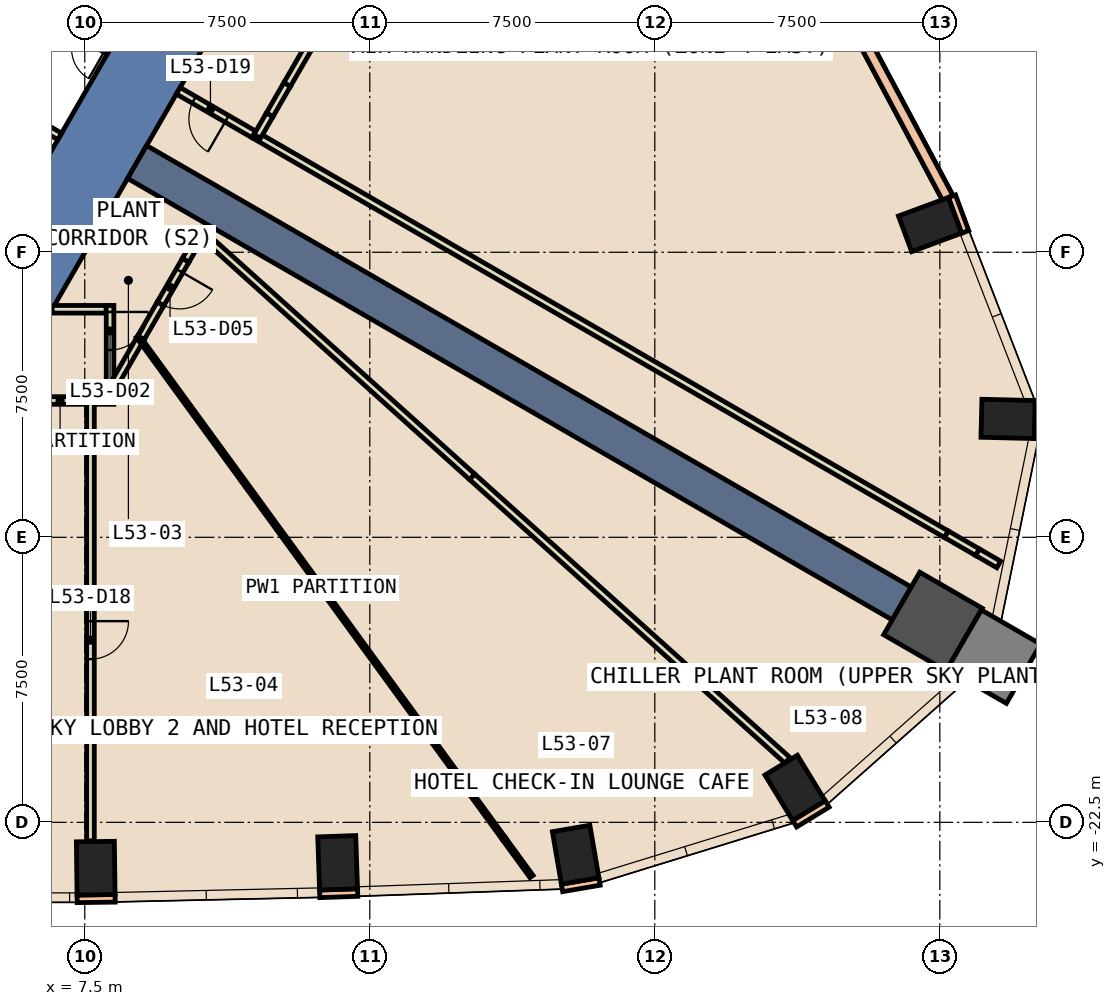
"""IFC4 building model, lengths in metres.
Left out: names, types, materials, properties, quantities, classifications, styles, units other than length and angle.
Written with IfcOpenShell. Run it as: python <this file> out.ifc"""

import sys

from ifc_helpers import new_model, si_unit, direction, frame, frame_2d, origin, origin_2d, place, context, subcontext, project, spatial, polyline, rectangle, outline, extrude, element, fill, save


model = new_model("IFC4")
c1 = context("Model", 3, precision=1e-05, world=origin(), true_north=direction((0.0, 1.0)))
c2 = subcontext(c1, "Body", "Model", "MODEL_VIEW")
j1 = project(units=[si_unit("LENGTHUNIT", "METRE"), si_unit("PLANEANGLEUNIT", "RADIAN")], contexts=[c1])
p1 = place(None, origin())
s1 = spatial("IfcSite", under=j1, at=p1, CompositionType="ELEMENT")
p2 = place(p1, origin())
s2 = spatial("IfcBuilding", under=s1, at=p2, CompositionType="ELEMENT")
p3 = place(p2, frame((0.0, 0.0, 236.0)))
s3 = spatial("IfcBuildingStorey", under=s2, at=p3, CompositionType="ELEMENT", Elevation=236.0)
for number, where, z_axis, x_axis in (
    (1, (7.788, -23.706, -0.6), (0.0, 0.0, 1.0), (1.0, 0.013, 0.0)),
    (2, (14.154, -23.565, -0.6), (0.0, 0.0, 1.0), (0.999, 0.034, 0.0)),
    (3, (20.417, -23.352, -0.6), (0.0, 0.0, 1.0), (0.986, 0.169, 0.0)),
    (4, (26.19, -21.593, -0.6), (0.0, 0.0, 1.0), (0.853, 0.521, 0.0)),
):
    element("IfcColumn", number, at=place(p3, frame(where, z_axis=z_axis, x_axis=x_axis)), inside=s3, PredefinedType="COLUMN", context=c2, shape_type="SweptSolid", body=[
        extrude(rectangle(XDim=1.0, YDim=1.4, at=origin_2d()), origin(), (0.0, 0.0, 1.0), 5.4),
    ])
p4 = place(p3, frame((29.82, -17.216, -0.6), z_axis=(0.0, 0.0, 1.0), x_axis=(-0.866025403784, 0.5, 0.0)))
e5 = element("IfcColumn", 5, at=p4, inside=s3, PredefinedType="COLUMN", context=c2, shape_type="SweptSolid", body=[
    extrude(rectangle(XDim=1.9, YDim=1.9, at=origin_2d()), origin(), (0.0, 0.0, 1.0), 5.4),
])
for number, where, z_axis, x_axis in (
    (6, (31.795, -11.885, -0.6), (0.0, 0.0, 1.0), (0.025, 1.0, 0.0)),
    (7, (29.742, -6.772, -0.6), (0.0, 0.0, 1.0), (-0.347, 0.938, 0.0)),
):
    element("IfcColumn", number, at=place(p3, frame(where, z_axis=z_axis, x_axis=x_axis)), inside=s3, PredefinedType="COLUMN", context=c2, shape_type="SweptSolid", body=[
        extrude(rectangle(XDim=1.0, YDim=1.4, at=origin_2d()), origin(), (0.0, 0.0, 1.0), 5.4),
    ])
p5 = place(p3, frame((31.422, -18.141, -0.6), z_axis=(0.0, 0.0, 1.0), x_axis=(-0.866025403784, 0.5, 0.0)))
e8 = element("IfcColumn", 8, at=p5, inside=s3, PredefinedType="COLUMN", context=c2, shape_type="SweptSolid", body=[
    extrude(rectangle(XDim=1.8, YDim=1.8, at=origin_2d()), origin(), (0.0, 0.0, 1.0), 5.4),
])
p6 = place(p3, frame((0.0, 0.0, -0.6)))
e9 = element("IfcWall", 9, at=p6, inside=s3, PredefinedType="SHEAR", context=c2, shape_type="SweptSolid", body=[
    extrude(outline(polyline([(6.64, -9.0), (13.279, 2.5), (10.854, 2.5), (5.427, -6.9), (6.64, -9.0)])), origin(), (0.0, 0.0, 1.0), 5.4),
])
p7 = place(p3, frame((8.877, -5.125, 0.0), z_axis=(0.0, 0.0, 1.0), x_axis=(0.866032640494, -0.499987465442, 0.0)))
e10 = element("IfcWall", 10, at=p7, inside=s3, PredefinedType="SHEAR", context=c2, shape_type="SweptSolid", body=[
    extrude(rectangle(XDim=23.232, YDim=1.0, at=frame_2d((11.616, 0.0))), origin(), (0.0, 0.0, 1.0), 4.8),
])
p8 = place(p3, frame((30.666, -6.964, 0.0), z_axis=(0.0, 0.0, 1.0), x_axis=(-0.346813520822, 0.937934103109, 0.0)))
e11 = element("IfcWall", 11, at=p8, inside=s3, PredefinedType="STANDARD", context=c2, shape_type="SweptSolid", body=[
    extrude(rectangle(XDim=1.0, YDim=0.2, at=frame_2d((0.5, 0.0))), origin(), (0.0, 0.0, 1.0), 4.8),
])
p9 = place(p3, frame((7.299, -24.513, 0.0), z_axis=(0.0, 0.0, 1.0), x_axis=(0.999903186316, 0.013914668364, 0.0)))
e12 = element("IfcWall", 12, at=p9, inside=s3, PredefinedType="STANDARD", context=c2, shape_type="SweptSolid", body=[
    extrude(rectangle(XDim=1.0, YDim=0.2, at=frame_2d((0.5, 0.0))), origin(), (0.0, 0.0, 1.0), 4.8),
])
p10 = place(p3, frame((13.682, -24.381, 0.0), z_axis=(0.0, 0.0, 1.0), x_axis=(0.999415245245, 0.034193092457, 0.0)))
e13 = element("IfcWall", 13, at=p10, inside=s3, PredefinedType="STANDARD", context=c2, shape_type="SweptSolid", body=[
    extrude(rectangle(XDim=1.0, YDim=0.2, at=frame_2d((0.5, 0.0))), origin(), (0.0, 0.0, 1.0), 4.8),
])
p11 = place(p3, frame((20.059, -24.225, 0.0), z_axis=(0.0, 0.0, 1.0), x_axis=(0.985590881145, 0.169146726259, 0.0)))
e14 = element("IfcWall", 14, at=p11, inside=s3, PredefinedType="STANDARD", context=c2, shape_type="SweptSolid", body=[
    extrude(rectangle(XDim=1.0, YDim=0.2, at=frame_2d((0.5, 0.0))), origin(), (0.0, 0.0, 1.0), 4.8),
])
p12 = place(p3, frame((26.18, -22.536, 0.0), z_axis=(0.0, 0.0, 1.0), x_axis=(0.853679739553, 0.520798331677, 0.0)))
e15 = element("IfcWall", 15, at=p12, inside=s3, PredefinedType="STANDARD", context=c2, shape_type="SweptSolid", body=[
    extrude(rectangle(XDim=1.0, YDim=0.2, at=frame_2d((0.5, 0.0))), origin(), (0.0, 0.0, 1.0), 4.8),
])
p13 = place(p3, frame((32.583, -12.404, 0.0), z_axis=(0.0, 0.0, 1.0), x_axis=(0.023942303888, 0.999713341956, 0.0)))
e16 = element("IfcWall", 16, at=p13, inside=s3, PredefinedType="STANDARD", context=c2, shape_type="SweptSolid", body=[
    extrude(rectangle(XDim=0.999, YDim=0.2, at=frame_2d((0.5, 0.0))), origin(), (0.0, 0.0, 1.0), 4.8),
])
p14 = place(p3, frame((30.207, -6.068, 0.0), z_axis=(0.0, 0.0, 1.0), x_axis=(-0.470523779067, 0.882387314807, 0.0)))
e17 = element("IfcWall", 17, at=p14, inside=s3, PredefinedType="STANDARD", context=c2, shape_type="SweptSolid", body=[
    extrude(rectangle(XDim=7.471, YDim=0.3, at=frame_2d((3.735, 0.0))), origin(), (0.0, 0.0, 1.0), 1.2),
])
p15 = place(p3, frame((30.207, -6.068, 4.0), z_axis=(0.0, 0.0, 1.0), x_axis=(-0.470523779067, 0.882387314807, 0.0)))
e18 = element("IfcWall", 18, at=p15, inside=s3, PredefinedType="STANDARD", context=c2, shape_type="SweptSolid", body=[
    extrude(rectangle(XDim=7.471, YDim=0.3, at=frame_2d((3.735, 0.0))), origin(), (0.0, 0.0, 1.0), 0.8),
])
p16 = place(p3, frame((5.888, -3.902, 0.0), z_axis=(0.0, 0.0, 1.0), x_axis=(0.86621513555, -0.499671230855, 0.0)))
e19 = element("IfcWall", 19, at=p16, inside=s3, PredefinedType="PARTITIONING", context=c2, shape_type="SweptSolid", body=[
    extrude(rectangle(XDim=1.1, YDim=0.2, at=frame_2d((0.55, 0.0))), origin(), (0.0, 0.0, 1.0), 4.8),
])
p17 = place(p3, frame((8.14, -2.2, 0.0), z_axis=(0.0, 0.0, 1.0), x_axis=(-0.865841558281, 0.500318294642, 0.0)))
e20 = element("IfcWall", 20, at=p17, inside=s3, PredefinedType="PARTITIONING", context=c2, shape_type="SweptSolid", body=[
    extrude(rectangle(XDim=1.099, YDim=0.2, at=frame_2d((0.55, 0.0))), origin(), (0.0, 0.0, 1.0), 4.8),
])
p18 = place(p17, frame((0.1, 0.0, 0.0)))
e21 = element("IfcOpeningElement", 21, at=p18, cuts=e20, PredefinedType="OPENING", context=c2, shape_type="SweptSolid", body=[
    extrude(rectangle(XDim=0.9, YDim=2.1, at=frame_2d((0.45, 1.05))), frame((0.0, 0.11, 0.0), z_axis=(0.0, -1.0, 0.0), x_axis=(1.0, 0.0, 0.0)), (0.0, 0.0, 1.0), 0.22),
])
p19 = place(p3, frame((7.55, -11.4, 0.0), z_axis=(0.0, 0.0, 1.0), x_axis=(-1.0, 0.0, 0.0)))
e22 = element("IfcWall", 22, at=p19, inside=s3, PredefinedType="PARTITIONING", context=c2, shape_type="SweptSolid", body=[
    extrude(rectangle(XDim=1.399, YDim=0.2, at=frame_2d((0.7, 0.0))), origin(), (0.0, 0.0, 1.0), 4.8),
])
p20 = place(p3, frame((6.64, -9.0, 0.0), z_axis=(0.0, 0.0, 1.0), x_axis=(1.0, 0.0, 0.0)))
e23 = element("IfcWall", 23, at=p20, inside=s3, PredefinedType="PARTITIONING", context=c2, shape_type="SweptSolid", body=[
    extrude(rectangle(XDim=1.425, YDim=0.2, at=frame_2d((0.712, 0.0))), origin(), (0.0, 0.0, 1.0), 4.8),
])
p21 = place(p3, frame((8.165, -8.9, 0.0), z_axis=(0.0, 0.0, 1.0), x_axis=(0.0, -1.0, 0.0)))
e24 = element("IfcWall", 24, at=p21, inside=s3, PredefinedType="PARTITIONING", context=c2, shape_type="SweptSolid", body=[
    extrude(rectangle(XDim=2.359, YDim=0.2, at=frame_2d((1.18, 0.0))), origin(), (0.0, 0.0, 1.0), 4.8),
])
p22 = place(p21, frame((0.171, 0.0, 0.0)))
e25 = element("IfcOpeningElement", 25, at=p22, cuts=e24, PredefinedType="OPENING", context=c2, shape_type="SweptSolid", body=[
    extrude(rectangle(XDim=1.0, YDim=2.1, at=frame_2d((0.5, 1.05))), frame((0.0, 0.11, 0.0), z_axis=(0.0, -1.0, 0.0), x_axis=(1.0, 0.0, 0.0)), (0.0, 0.0, 1.0), 0.22),
])
p23 = place(p3, frame((8.265, -11.4, 0.0), z_axis=(0.0, 0.0, 1.0), x_axis=(-1.0, 0.0, 0.0)))
e26 = element("IfcWall", 26, at=p23, inside=s3, PredefinedType="PARTITIONING", context=c2, shape_type="SweptSolid", body=[
    extrude(rectangle(XDim=0.515, YDim=0.2, at=frame_2d((0.257, 0.0))), origin(), (0.0, 0.0, 1.0), 4.8),
])
p24 = place(p3, frame((7.65, -11.3, 0.0), z_axis=(0.0, 0.0, 1.0), x_axis=(0.0, -1.0, 0.0)))
e27 = element("IfcWall", 27, at=p24, inside=s3, PredefinedType="PARTITIONING", context=c2, shape_type="SweptSolid", body=[
    extrude(rectangle(XDim=5.465, YDim=0.2, at=frame_2d((2.732, 0.0))), origin(), (0.0, 0.0, 1.0), 4.8),
])
p25 = place(p3, frame((8.98, -9.747, 0.0), z_axis=(0.0, 0.0, 1.0), x_axis=(-0.499908274205, -0.866078355221, 0.0)))
e28 = element("IfcWall", 28, at=p25, inside=s3, PredefinedType="PARTITIONING", context=c2, shape_type="SweptSolid", body=[
    extrude(rectangle(XDim=1.63, YDim=0.2, at=frame_2d((0.815, 0.0))), origin(), (0.0, 0.0, 1.0), 4.8),
])
p26 = place(p3, frame((10.566, -7.0, 0.0), z_axis=(0.0, 0.0, 1.0), x_axis=(-0.500252895651, -0.86587934517, 0.0)))
e29 = element("IfcWall", 29, at=p26, inside=s3, PredefinedType="PARTITIONING", context=c2, shape_type="SweptSolid", body=[
    extrude(rectangle(XDim=0.823, YDim=0.2, at=frame_2d((0.412, 0.0))), origin(), (0.0, 0.0, 1.0), 2.4),
])
p27 = place(p3, frame((8.896, -9.709, 0.0), z_axis=(0.0, 0.0, 1.0), x_axis=(0.588922600502, -0.808189439808, 0.0)))
e30 = element("IfcWall", 30, at=p27, inside=s3, PredefinedType="PARTITIONING", context=c2, shape_type="SweptSolid", body=[
    extrude(rectangle(XDim=16.369, YDim=0.1, at=frame_2d((8.184, 0.0))), origin(), (0.0, 0.0, 1.0), 4.8),
])
p28 = place(p3, frame((10.492, -6.933, 0.0), z_axis=(0.0, 0.0, 1.0), x_axis=(0.743607411776, -0.668616494825, 0.0)))
e31 = element("IfcWall", 31, at=p28, inside=s3, PredefinedType="PARTITIONING", context=c2, shape_type="SweptSolid", body=[
    extrude(rectangle(XDim=9.685, YDim=0.2, at=frame_2d((4.843, 0.0))), origin(), (0.0, 0.0, 1.0), 2.4),
])
p29 = place(p3, frame((11.951, -4.4, 0.0), z_axis=(0.0, 0.0, 1.0), x_axis=(-0.866053019151, 0.499952165731, 0.0)))
e32 = element("IfcWall", 32, at=p29, inside=s3, PredefinedType="PARTITIONING", context=c2, shape_type="SweptSolid", body=[
    extrude(rectangle(XDim=2.3, YDim=0.2, at=frame_2d((1.15, 0.0))), origin(), (0.0, 0.0, 1.0), 4.8),
])
p30 = place(p29, frame((0.821, 0.0, 0.0)))
e33 = element("IfcOpeningElement", 33, at=p30, cuts=e32, PredefinedType="OPENING", context=c2, shape_type="SweptSolid", body=[
    extrude(rectangle(XDim=1.0, YDim=2.1, at=frame_2d((0.5, 1.05))), frame((0.0, 0.11, 0.0), z_axis=(0.0, -1.0, 0.0), x_axis=(1.0, 0.0, 0.0)), (0.0, 0.0, 1.0), 0.22),
])
p31 = place(p3, frame((11.951, -4.4, 0.0), z_axis=(0.0, 0.0, 1.0), x_axis=(0.866036805702, -0.49998025078, 0.0)))
e34 = element("IfcWall", 34, at=p31, inside=s3, PredefinedType="PARTITIONING", context=c2, shape_type="SweptSolid", body=[
    extrude(rectangle(XDim=21.041, YDim=0.2, at=frame_2d((10.521, 0.0))), origin(), (0.0, 0.0, 1.0), 4.8),
])
p32 = place(p3, frame((7.65, -16.765, 0.0), z_axis=(0.0, 0.0, 1.0), x_axis=(0.0, -1.0, 0.0)))
e35 = element("IfcWall", 35, at=p32, inside=s3, PredefinedType="PARTITIONING", context=c2, shape_type="SweptSolid", body=[
    extrude(rectangle(XDim=3.157, YDim=0.2, at=frame_2d((1.579, 0.0))), origin(), (0.0, 0.0, 1.0), 2.4),
])
p33 = place(p32, frame((0.441, 0.0, 0.0)))
e36 = element("IfcOpeningElement", 36, at=p33, cuts=e35, PredefinedType="OPENING", context=c2, shape_type="SweptSolid", body=[
    extrude(rectangle(XDim=1.0, YDim=2.1, at=frame_2d((0.5, 1.05))), frame((0.0, 0.11, 0.0), z_axis=(0.0, -1.0, 0.0), x_axis=(1.0, 0.0, 0.0)), (0.0, 0.0, 1.0), 0.22),
])
p34 = place(p3, frame((7.65, -19.922, 0.0), z_axis=(0.0, 0.0, 1.0), x_axis=(0.0, -1.0, 0.0)))
e37 = element("IfcWall", 37, at=p34, inside=s3, PredefinedType="PARTITIONING", context=c2, shape_type="SweptSolid", body=[
    extrude(rectangle(XDim=3.066, YDim=0.2, at=frame_2d((1.533, 0.0))), origin(), (0.0, 0.0, 1.0), 4.8),
])
p35 = place(p3, frame((10.154, -7.713, 0.0), z_axis=(0.0, 0.0, 1.0), x_axis=(-0.500265304803, -0.865872175792, 0.0)))
e38 = element("IfcWall", 38, at=p35, inside=s3, PredefinedType="PARTITIONING", context=c2, shape_type="SweptSolid", body=[
    extrude(rectangle(XDim=1.323, YDim=0.2, at=frame_2d((0.662, 0.0))), origin(), (0.0, 0.0, 1.0), 4.8),
])
p36 = place(p35, frame((0.32, 0.0, 0.0)))
e39 = element("IfcOpeningElement", 39, at=p36, cuts=e38, PredefinedType="OPENING", context=c2, shape_type="SweptSolid", body=[
    extrude(rectangle(XDim=1.0, YDim=2.1, at=frame_2d((0.5, 1.05))), frame((0.0, 0.11, 0.0), z_axis=(0.0, -1.0, 0.0), x_axis=(1.0, 0.0, 0.0)), (0.0, 0.0, 1.0), 0.22),
])
p37 = place(p3, frame((9.492, -8.859, 0.0), z_axis=(0.0, 0.0, 1.0), x_axis=(-0.499392554388, -0.866375828738, 0.0)))
e40 = element("IfcWall", 40, at=p37, inside=s3, PredefinedType="PARTITIONING", context=c2, shape_type="SweptSolid", body=[
    extrude(rectangle(XDim=1.025, YDim=0.2, at=frame_2d((0.513, 0.0))), origin(), (0.0, 0.0, 1.0), 2.4),
])
p38 = place(p3, frame((18.536, -22.938, 0.0), z_axis=(0.0, 0.0, 1.0), x_axis=(0.588777790092, -0.808294942391, 0.0)))
e41 = element("IfcWall", 41, at=p38, inside=s3, PredefinedType="PARTITIONING", context=c2, shape_type="SweptSolid", body=[
    extrude(rectangle(XDim=1.221, YDim=0.1, at=frame_2d((0.611, 0.0))), origin(), (0.0, 0.0, 1.0), 2.4),
])
p39 = place(p3, frame((17.694, -13.409, 0.0), z_axis=(0.0, 0.0, 1.0), x_axis=(0.743600848277, -0.668623794403, 0.0)))
e42 = element("IfcWall", 42, at=p39, inside=s3, PredefinedType="PARTITIONING", context=c2, shape_type="SweptSolid", body=[
    extrude(rectangle(XDim=11.159, YDim=0.2, at=frame_2d((5.58, 0.0))), origin(), (0.0, 0.0, 1.0), 4.8),
])
p40 = place(p3, frame((30.173, -14.92, 0.0), z_axis=(0.0, 0.0, 1.0), x_axis=(0.866108284413, -0.499856419056, 0.0)))
e43 = element("IfcWall", 43, at=p40, inside=s3, PredefinedType="PARTITIONING", context=c2, shape_type="SweptSolid", body=[
    extrude(rectangle(XDim=0.947, YDim=0.2, at=frame_2d((0.473, 0.0))), origin(), (0.0, 0.0, 1.0), 2.4),
])
p41 = place(p3, frame((30.993, -15.393, 0.0), z_axis=(0.0, 0.0, 1.0), x_axis=(0.865781063021, -0.500422972009, 0.0)))
e44 = element("IfcWall", 44, at=p41, inside=s3, PredefinedType="PARTITIONING", context=c2, shape_type="SweptSolid", body=[
    extrude(rectangle(XDim=0.644, YDim=0.2, at=frame_2d((0.322, 0.0))), origin(), (0.0, 0.0, 1.0), 4.8),
])
p42 = place(p3, frame((13.381, -2.124, 0.0), z_axis=(0.0, 0.0, 1.0), x_axis=(-0.500431039639, -0.865776399866, 0.0)))
e45 = element("IfcWall", 45, at=p42, inside=s3, PredefinedType="PARTITIONING", context=c2, shape_type="SweptSolid", body=[
    extrude(rectangle(XDim=1.113, YDim=0.2, at=frame_2d((0.557, 0.0))), origin(), (0.0, 0.0, 1.0), 4.8),
])
p43 = place(p3, frame((12.824, -3.088, 0.0), z_axis=(0.0, 0.0, 1.0), x_axis=(-0.499454108712, -0.866340344952, 0.0)))
e46 = element("IfcWall", 46, at=p43, inside=s3, PredefinedType="PARTITIONING", context=c2, shape_type="SweptSolid", body=[
    extrude(rectangle(XDim=0.919, YDim=0.2, at=frame_2d((0.459, 0.0))), origin(), (0.0, 0.0, 1.0), 2.4),
])
p44 = place(p3, frame((12.365, -3.884, 0.0), z_axis=(0.0, 0.0, 1.0), x_axis=(-0.500196687681, -0.865911816314, 0.0)))
e47 = element("IfcWall", 47, at=p44, inside=s3, PredefinedType="PARTITIONING", context=c2, shape_type="SweptSolid", body=[
    extrude(rectangle(XDim=0.654, YDim=0.2, at=frame_2d((0.327, 0.0))), origin(), (0.0, 0.0, 1.0), 4.8),
])
p45 = place(p3, frame((5.492, -3.788, 0.0), z_axis=(0.0, 0.0, 1.0), x_axis=(0.500034260056, 0.866005622828, 0.0)))
e48 = element("IfcWall", 48, at=p45, inside=s3, PredefinedType="STANDARD", context=c2, shape_type="SweptSolid", body=[
    extrude(rectangle(XDim=5.399, YDim=0.2, at=frame_2d((2.7, 0.0))), origin(), (0.0, 0.0, 1.0), 4.8),
])
p46 = place(p22, origin())
e49 = element("IfcDoor", 49, at=p46, inside=s3, OperationType="SINGLE_SWING_RIGHT", PredefinedType="DOOR", context=c2, shape_type="SweptSolid", body=[
    extrude(rectangle(XDim=1.0, YDim=2.1, at=frame_2d((0.5, 1.05))), frame((0.0, 0.025, 0.0), z_axis=(0.0, -1.0, 0.0), x_axis=(1.0, 0.0, 0.0)), (0.0, 0.0, 1.0), 0.05),
])
fill(e25, e49)
p47 = place(p36, origin())
e50 = element("IfcDoor", 50, at=p47, inside=s3, OperationType="SINGLE_SWING_LEFT", PredefinedType="DOOR", context=c2, shape_type="SweptSolid", body=[
    extrude(rectangle(XDim=1.0, YDim=2.1, at=frame_2d((0.5, 1.05))), frame((0.0, 0.025, 0.0), z_axis=(0.0, -1.0, 0.0), x_axis=(1.0, 0.0, 0.0)), (0.0, 0.0, 1.0), 0.05),
])
fill(e39, e50)
p48 = place(p33, origin())
e51 = element("IfcDoor", 51, at=p48, inside=s3, OperationType="SINGLE_SWING_RIGHT", PredefinedType="DOOR", context=c2, shape_type="SweptSolid", body=[
    extrude(rectangle(XDim=1.0, YDim=2.1, at=frame_2d((0.5, 1.05))), frame((0.0, 0.025, 0.0), z_axis=(0.0, -1.0, 0.0), x_axis=(1.0, 0.0, 0.0)), (0.0, 0.0, 1.0), 0.05),
])
fill(e36, e51)
p49 = place(p30, origin())
e52 = element("IfcDoor", 52, at=p49, inside=s3, OperationType="SINGLE_SWING_LEFT", PredefinedType="DOOR", context=c2, shape_type="SweptSolid", body=[
    extrude(rectangle(XDim=1.0, YDim=2.1, at=frame_2d((0.5, 1.05))), frame((0.0, 0.025, 0.0), z_axis=(0.0, -1.0, 0.0), x_axis=(1.0, 0.0, 0.0)), (0.0, 0.0, 1.0), 0.05),
])
fill(e33, e52)
save(model, sys.argv[1])
